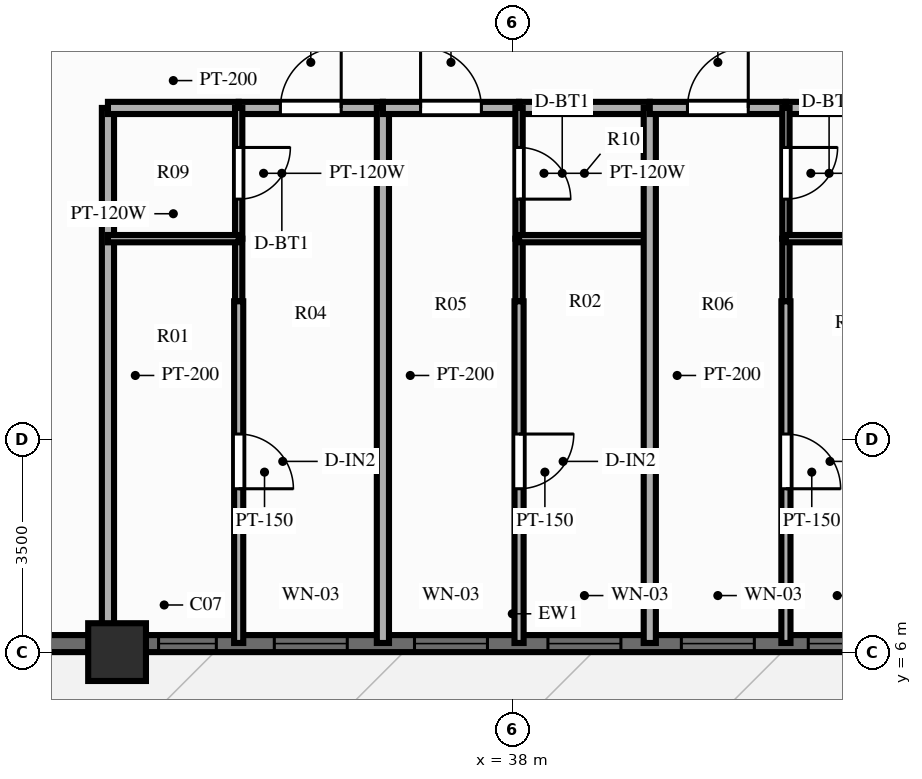
"""IFC4 building model, lengths in metres.
Left out: names, types, materials, properties, quantities, classifications, styles, units other than length and angle.
Written with IfcOpenShell. Run it as: python <this file> out.ifc"""

import sys

from ifc_helpers import new_model, si_unit, direction, frame, frame_2d, origin, origin_2d, place, context, subcontext, project, spatial, rectangle, extrude, source, transform, mapped, element, fill, save


model = new_model("IFC4")
c1 = context("Model", 3, precision=1e-05, world=origin(), true_north=direction((0.0, 1.0)))
c2 = subcontext(c1, "Body", "Model", "MODEL_VIEW")
j1 = project(units=[si_unit("LENGTHUNIT", "METRE"), si_unit("PLANEANGLEUNIT", "RADIAN")], contexts=[c1])
p1 = place(None, origin())
s1 = spatial("IfcSite", under=j1, at=p1, CompositionType="ELEMENT")
p2 = place(p1, origin())
s2 = spatial("IfcBuilding", under=s1, at=p2, CompositionType="ELEMENT")
p3 = place(p2, frame((0.0, 0.0, 169.0)))
s3 = spatial("IfcBuildingStorey", under=s2, at=p3, CompositionType="ELEMENT", Elevation=169.0)
m1 = source(origin(), c2, "Body", "SweptSolid", [
    extrude(rectangle(XDim=0.95, YDim=0.95, at=origin_2d()), origin(), (0.0, 0.0, 1.0), 3.9),
])
p4 = place(p3, frame((31.5, 6.0, 0.0), z_axis=(0.0, 0.0, 1.0), x_axis=(1.0, 0.0, 0.0)))
e1 = element("IfcColumn", 1, at=p4, inside=s3, PredefinedType="COLUMN", context=c2, shape_type="MappedRepresentation", body=[
    mapped(m1, transform((0.0, 0.0, 0.0), scale=1.0)),
])
p5 = place(p3, frame((21.0, 6.14, 0.0), z_axis=(0.0, 0.0, 1.0), x_axis=(1.0, 0.0, 0.0)))
e2 = element("IfcWall", 2, at=p5, inside=s3, PredefinedType="SOLIDWALL", context=c2, shape_type="SweptSolid", body=[
    extrude(rectangle(XDim=34.0, YDim=0.28, at=frame_2d((17.0, 0.0))), origin(), (0.0, 0.0, 1.0), 2.44),
])
p6 = place(p5, frame((5.8, 0.0, 0.0), z_axis=(0.0, 0.0, 1.0), x_axis=(-1.0, 0.0, 0.0)))
e3 = element("IfcOpeningElement", 3, at=p6, cuts=e2, PredefinedType="OPENING", context=c2, shape_type="SweptSolid", body=[
    extrude(rectangle(XDim=1.1, YDim=2.15, at=frame_2d((0.55, 1.075))), frame((0.0, 0.152, 0.0), z_axis=(0.0, -1.0, 0.0), x_axis=(1.0, 0.0, 0.0)), (0.0, 0.0, 1.0), 0.304),
])
p7 = place(p5, frame((11.183, 0.0, 0.25)))
e4 = element("IfcOpeningElement", 4, at=p7, cuts=e2, PredefinedType="OPENING", context=c2, shape_type="SweptSolid", body=[
    extrude(rectangle(XDim=0.95, YDim=1.5, at=frame_2d((0.475, 0.75))), frame((0.0, 0.152, 0.0), z_axis=(0.0, -1.0, 0.0), x_axis=(1.0, 0.0, 0.0)), (0.0, 0.0, 1.0), 0.304),
])
p8 = place(p5, frame((13.086, 0.0, 0.25)))
e5 = element("IfcOpeningElement", 5, at=p8, cuts=e2, PredefinedType="OPENING", context=c2, shape_type="SweptSolid", body=[
    extrude(rectangle(XDim=1.2, YDim=1.5, at=frame_2d((0.6, 0.75))), frame((0.0, 0.152, 0.0), z_axis=(0.0, -1.0, 0.0), x_axis=(1.0, 0.0, 0.0)), (0.0, 0.0, 1.0), 0.304),
])
p9 = place(p5, frame((15.392, 0.0, 0.25)))
e6 = element("IfcOpeningElement", 6, at=p9, cuts=e2, PredefinedType="OPENING", context=c2, shape_type="SweptSolid", body=[
    extrude(rectangle(XDim=1.2, YDim=1.5, at=frame_2d((0.6, 0.75))), frame((0.0, 0.152, 0.0), z_axis=(0.0, -1.0, 0.0), x_axis=(1.0, 0.0, 0.0)), (0.0, 0.0, 1.0), 0.304),
])
p10 = place(p5, frame((17.586, 0.0, 0.25)))
e7 = element("IfcOpeningElement", 7, at=p10, cuts=e2, PredefinedType="OPENING", context=c2, shape_type="SweptSolid", body=[
    extrude(rectangle(XDim=1.2, YDim=1.5, at=frame_2d((0.6, 0.75))), frame((0.0, 0.152, 0.0), z_axis=(0.0, -1.0, 0.0), x_axis=(1.0, 0.0, 0.0)), (0.0, 0.0, 1.0), 0.304),
])
p11 = place(p5, frame((19.781, 0.0, 0.25)))
e8 = element("IfcOpeningElement", 8, at=p11, cuts=e2, PredefinedType="OPENING", context=c2, shape_type="SweptSolid", body=[
    extrude(rectangle(XDim=1.2, YDim=1.5, at=frame_2d((0.6, 0.75))), frame((0.0, 0.152, 0.0), z_axis=(0.0, -1.0, 0.0), x_axis=(1.0, 0.0, 0.0)), (0.0, 0.0, 1.0), 0.304),
])
p12 = place(p5, frame((21.867, 0.0, 0.25)))
e9 = element("IfcOpeningElement", 9, at=p12, cuts=e2, PredefinedType="OPENING", context=c2, shape_type="SweptSolid", body=[
    extrude(rectangle(XDim=0.95, YDim=1.5, at=frame_2d((0.475, 0.75))), frame((0.0, 0.152, 0.0), z_axis=(0.0, -1.0, 0.0), x_axis=(1.0, 0.0, 0.0)), (0.0, 0.0, 1.0), 0.304),
])
p13 = place(p5, frame((28.15, 0.0, 0.25)))
e10 = element("IfcOpeningElement", 10, at=p13, cuts=e2, PredefinedType="OPENING", context=c2, shape_type="SweptSolid", body=[
    extrude(rectangle(XDim=1.2, YDim=1.5, at=frame_2d((0.6, 0.75))), frame((0.0, 0.152, 0.0), z_axis=(0.0, -1.0, 0.0), x_axis=(1.0, 0.0, 0.0)), (0.0, 0.0, 1.0), 0.304),
])
p14 = place(p3, frame((31.35, 14.95, 0.0), z_axis=(0.0, 0.0, 1.0), x_axis=(0.0, -1.0, 0.0)))
e11 = element("IfcWall", 11, at=p14, inside=s3, PredefinedType="PARTITIONING", context=c2, shape_type="SweptSolid", body=[
    extrude(rectangle(XDim=8.8, YDim=0.2, at=frame_2d((4.4, 0.0))), origin(), (0.0, 0.0, 1.0), 2.44),
])
p15 = place(p3, frame((31.35, 14.95, 0.0), z_axis=(0.0, 0.0, 1.0), x_axis=(1.0, 0.0, 0.0)))
e12 = element("IfcWall", 12, at=p15, inside=s3, PredefinedType="PARTITIONING", context=c2, shape_type="SweptSolid", body=[
    extrude(rectangle(XDim=2.15, YDim=0.2, at=frame_2d((1.075, 0.0))), origin(), (0.0, 0.0, 1.0), 3.56),
])
p16 = place(p3, frame((33.5, 14.95, 0.0), z_axis=(0.0, 0.0, 1.0), x_axis=(1.0, 0.0, 0.0)))
e13 = element("IfcWall", 13, at=p16, inside=s3, PredefinedType="PARTITIONING", context=c2, shape_type="SweptSolid", body=[
    extrude(rectangle(XDim=2.372, YDim=0.2, at=frame_2d((1.186, 0.0))), origin(), (0.0, 0.0, 1.0), 3.56),
])
p17 = place(p16, frame((0.686, 0.0, 0.0)))
e14 = element("IfcOpeningElement", 14, at=p17, cuts=e13, PredefinedType="OPENING", context=c2, shape_type="SweptSolid", body=[
    extrude(rectangle(XDim=1.0, YDim=2.15, at=frame_2d((0.5, 1.075))), frame((0.0, 0.112, 0.0), z_axis=(0.0, -1.0, 0.0), x_axis=(1.0, 0.0, 0.0)), (0.0, 0.0, 1.0), 0.224),
])
p18 = place(p3, frame((33.5, 14.95, 0.0), z_axis=(0.0, 0.0, 1.0), x_axis=(0.0, -1.0, 0.0)))
e15 = element("IfcWall", 15, at=p18, inside=s3, PredefinedType="PARTITIONING", context=c2, shape_type="SweptSolid", body=[
    extrude(rectangle(XDim=2.15, YDim=0.12, at=frame_2d((1.075, 0.0))), origin(), (0.0, 0.0, 1.0), 3.56),
])
p19 = place(p18, frame((0.65, 0.0, 0.0)))
e16 = element("IfcOpeningElement", 16, at=p19, cuts=e15, PredefinedType="OPENING", context=c2, shape_type="SweptSolid", body=[
    extrude(rectangle(XDim=0.85, YDim=2.05, at=frame_2d((0.425, 1.025))), frame((0.0, 0.072, 0.0), z_axis=(0.0, -1.0, 0.0), x_axis=(1.0, 0.0, 0.0)), (0.0, 0.0, 1.0), 0.144),
])
p20 = place(p3, frame((33.5, 12.8, 0.0), z_axis=(0.0, 0.0, 1.0), x_axis=(0.0, -1.0, 0.0)))
e17 = element("IfcWall", 17, at=p20, inside=s3, PredefinedType="PARTITIONING", context=c2, shape_type="SweptSolid", body=[
    extrude(rectangle(XDim=1.03, YDim=0.12, at=frame_2d((0.515, 0.0))), origin(), (0.0, 0.0, 1.0), 3.56),
])
p21 = place(p3, frame((31.35, 12.8, 0.0), z_axis=(0.0, 0.0, 1.0), x_axis=(1.0, 0.0, 0.0)))
e18 = element("IfcWall", 18, at=p21, inside=s3, PredefinedType="PARTITIONING", context=c2, shape_type="SweptSolid", body=[
    extrude(rectangle(XDim=2.15, YDim=0.12, at=frame_2d((1.075, 0.0))), origin(), (0.0, 0.0, 1.0), 3.56),
])
p22 = place(p3, frame((33.5, 11.77, 0.0), z_axis=(0.0, 0.0, 1.0), x_axis=(0.0, -1.0, 0.0)))
e19 = element("IfcWall", 19, at=p22, inside=s3, PredefinedType="PARTITIONING", context=c2, shape_type="SweptSolid", body=[
    extrude(rectangle(XDim=5.62, YDim=0.15, at=frame_2d((2.81, 0.0))), origin(), (0.0, 0.0, 1.0), 3.56),
])
p23 = place(p22, frame((2.183, 0.0, 0.0)))
e20 = element("IfcOpeningElement", 20, at=p23, cuts=e19, PredefinedType="OPENING", context=c2, shape_type="SweptSolid", body=[
    extrude(rectangle(XDim=0.9, YDim=2.1, at=frame_2d((0.45, 1.05))), frame((0.0, 0.087, 0.0), z_axis=(0.0, -1.0, 0.0), x_axis=(1.0, 0.0, 0.0)), (0.0, 0.0, 1.0), 0.174),
])
p24 = place(p3, frame((35.872, 14.95, 0.0), z_axis=(0.0, 0.0, 1.0), x_axis=(0.0, -1.0, 0.0)))
e21 = element("IfcWall", 21, at=p24, inside=s3, PredefinedType="PARTITIONING", context=c2, shape_type="SweptSolid", body=[
    extrude(rectangle(XDim=8.8, YDim=0.2, at=frame_2d((4.4, 0.0))), origin(), (0.0, 0.0, 1.0), 3.56),
])
p25 = place(p3, frame((35.872, 14.95, 0.0), z_axis=(0.0, 0.0, 1.0), x_axis=(1.0, 0.0, 0.0)))
e22 = element("IfcWall", 22, at=p25, inside=s3, PredefinedType="PARTITIONING", context=c2, shape_type="SweptSolid", body=[
    extrude(rectangle(XDim=2.239, YDim=0.2, at=frame_2d((1.12, 0.0))), origin(), (0.0, 0.0, 1.0), 3.56),
])
p26 = place(p25, frame((0.619, 0.0, 0.0)))
e23 = element("IfcOpeningElement", 23, at=p26, cuts=e22, PredefinedType="OPENING", context=c2, shape_type="SweptSolid", body=[
    extrude(rectangle(XDim=1.0, YDim=2.15, at=frame_2d((0.5, 1.075))), frame((0.0, 0.112, 0.0), z_axis=(0.0, -1.0, 0.0), x_axis=(1.0, 0.0, 0.0)), (0.0, 0.0, 1.0), 0.224),
])
p27 = place(p3, frame((38.111, 14.95, 0.0), z_axis=(0.0, 0.0, 1.0), x_axis=(1.0, 0.0, 0.0)))
e24 = element("IfcWall", 24, at=p27, inside=s3, PredefinedType="PARTITIONING", context=c2, shape_type="SweptSolid", body=[
    extrude(rectangle(XDim=2.15, YDim=0.2, at=frame_2d((1.075, 0.0))), origin(), (0.0, 0.0, 1.0), 3.56),
])
p28 = place(p3, frame((38.111, 14.95, 0.0), z_axis=(0.0, 0.0, 1.0), x_axis=(0.0, -1.0, 0.0)))
e25 = element("IfcWall", 25, at=p28, inside=s3, PredefinedType="PARTITIONING", context=c2, shape_type="SweptSolid", body=[
    extrude(rectangle(XDim=2.15, YDim=0.12, at=frame_2d((1.075, 0.0))), origin(), (0.0, 0.0, 1.0), 3.56),
])
p29 = place(p28, frame((0.65, 0.0, 0.0)))
e26 = element("IfcOpeningElement", 26, at=p29, cuts=e25, PredefinedType="OPENING", context=c2, shape_type="SweptSolid", body=[
    extrude(rectangle(XDim=0.85, YDim=2.05, at=frame_2d((0.425, 1.025))), frame((0.0, 0.072, 0.0), z_axis=(0.0, -1.0, 0.0), x_axis=(1.0, 0.0, 0.0)), (0.0, 0.0, 1.0), 0.144),
])
p30 = place(p3, frame((38.111, 12.8, 0.0), z_axis=(0.0, 0.0, 1.0), x_axis=(0.0, -1.0, 0.0)))
e27 = element("IfcWall", 27, at=p30, inside=s3, PredefinedType="PARTITIONING", context=c2, shape_type="SweptSolid", body=[
    extrude(rectangle(XDim=1.03, YDim=0.12, at=frame_2d((0.515, 0.0))), origin(), (0.0, 0.0, 1.0), 3.56),
])
p31 = place(p3, frame((38.111, 12.8, 0.0), z_axis=(0.0, 0.0, 1.0), x_axis=(1.0, 0.0, 0.0)))
e28 = element("IfcWall", 28, at=p31, inside=s3, PredefinedType="PARTITIONING", context=c2, shape_type="SweptSolid", body=[
    extrude(rectangle(XDim=2.15, YDim=0.12, at=frame_2d((1.075, 0.0))), origin(), (0.0, 0.0, 1.0), 3.56),
])
p32 = place(p3, frame((38.111, 11.77, 0.0), z_axis=(0.0, 0.0, 1.0), x_axis=(0.0, -1.0, 0.0)))
e29 = element("IfcWall", 29, at=p32, inside=s3, PredefinedType="PARTITIONING", context=c2, shape_type="SweptSolid", body=[
    extrude(rectangle(XDim=5.62, YDim=0.15, at=frame_2d((2.81, 0.0))), origin(), (0.0, 0.0, 1.0), 3.56),
])
p33 = place(p32, frame((2.183, 0.0, 0.0)))
e30 = element("IfcOpeningElement", 30, at=p33, cuts=e29, PredefinedType="OPENING", context=c2, shape_type="SweptSolid", body=[
    extrude(rectangle(XDim=0.9, YDim=2.1, at=frame_2d((0.45, 1.05))), frame((0.0, 0.087, 0.0), z_axis=(0.0, -1.0, 0.0), x_axis=(1.0, 0.0, 0.0)), (0.0, 0.0, 1.0), 0.174),
])
p34 = place(p3, frame((40.261, 14.95, 0.0), z_axis=(0.0, 0.0, 1.0), x_axis=(0.0, -1.0, 0.0)))
e31 = element("IfcWall", 31, at=p34, inside=s3, PredefinedType="PARTITIONING", context=c2, shape_type="SweptSolid", body=[
    extrude(rectangle(XDim=8.8, YDim=0.2, at=frame_2d((4.4, 0.0))), origin(), (0.0, 0.0, 1.0), 3.56),
])
p35 = place(p3, frame((40.261, 14.95, 0.0), z_axis=(0.0, 0.0, 1.0), x_axis=(1.0, 0.0, 0.0)))
e32 = element("IfcWall", 32, at=p35, inside=s3, PredefinedType="PARTITIONING", context=c2, shape_type="SweptSolid", body=[
    extrude(rectangle(XDim=2.239, YDim=0.2, at=frame_2d((1.12, 0.0))), origin(), (0.0, 0.0, 1.0), 3.56),
])
p36 = place(p35, frame((0.619, 0.0, 0.0)))
e33 = element("IfcOpeningElement", 33, at=p36, cuts=e32, PredefinedType="OPENING", context=c2, shape_type="SweptSolid", body=[
    extrude(rectangle(XDim=1.0, YDim=2.15, at=frame_2d((0.5, 1.075))), frame((0.0, 0.112, 0.0), z_axis=(0.0, -1.0, 0.0), x_axis=(1.0, 0.0, 0.0)), (0.0, 0.0, 1.0), 0.224),
])
p37 = place(p3, frame((42.5, 14.95, 0.0), z_axis=(0.0, 0.0, 1.0), x_axis=(1.0, 0.0, 0.0)))
e34 = element("IfcWall", 34, at=p37, inside=s3, PredefinedType="PARTITIONING", context=c2, shape_type="SweptSolid", body=[
    extrude(rectangle(XDim=2.15, YDim=0.2, at=frame_2d((1.075, 0.0))), origin(), (0.0, 0.0, 1.0), 3.56),
])
p38 = place(p3, frame((42.5, 14.95, 0.0), z_axis=(0.0, 0.0, 1.0), x_axis=(0.0, -1.0, 0.0)))
e35 = element("IfcWall", 35, at=p38, inside=s3, PredefinedType="PARTITIONING", context=c2, shape_type="SweptSolid", body=[
    extrude(rectangle(XDim=2.15, YDim=0.12, at=frame_2d((1.075, 0.0))), origin(), (0.0, 0.0, 1.0), 3.56),
])
p39 = place(p38, frame((0.65, 0.0, 0.0)))
e36 = element("IfcOpeningElement", 36, at=p39, cuts=e35, PredefinedType="OPENING", context=c2, shape_type="SweptSolid", body=[
    extrude(rectangle(XDim=0.85, YDim=2.05, at=frame_2d((0.425, 1.025))), frame((0.0, 0.072, 0.0), z_axis=(0.0, -1.0, 0.0), x_axis=(1.0, 0.0, 0.0)), (0.0, 0.0, 1.0), 0.144),
])
p40 = place(p3, frame((42.5, 12.8, 0.0), z_axis=(0.0, 0.0, 1.0), x_axis=(0.0, -1.0, 0.0)))
e37 = element("IfcWall", 37, at=p40, inside=s3, PredefinedType="PARTITIONING", context=c2, shape_type="SweptSolid", body=[
    extrude(rectangle(XDim=1.03, YDim=0.12, at=frame_2d((0.515, 0.0))), origin(), (0.0, 0.0, 1.0), 3.56),
])
p41 = place(p3, frame((42.5, 12.8, 0.0), z_axis=(0.0, 0.0, 1.0), x_axis=(1.0, 0.0, 0.0)))
e38 = element("IfcWall", 38, at=p41, inside=s3, PredefinedType="PARTITIONING", context=c2, shape_type="SweptSolid", body=[
    extrude(rectangle(XDim=2.15, YDim=0.12, at=frame_2d((1.075, 0.0))), origin(), (0.0, 0.0, 1.0), 3.56),
])
p42 = place(p3, frame((42.5, 11.77, 0.0), z_axis=(0.0, 0.0, 1.0), x_axis=(0.0, -1.0, 0.0)))
e39 = element("IfcWall", 39, at=p42, inside=s3, PredefinedType="PARTITIONING", context=c2, shape_type="SweptSolid", body=[
    extrude(rectangle(XDim=5.62, YDim=0.15, at=frame_2d((2.81, 0.0))), origin(), (0.0, 0.0, 1.0), 3.56),
])
p43 = place(p42, frame((2.183, 0.0, 0.0)))
e40 = element("IfcOpeningElement", 40, at=p43, cuts=e39, PredefinedType="OPENING", context=c2, shape_type="SweptSolid", body=[
    extrude(rectangle(XDim=0.9, YDim=2.1, at=frame_2d((0.45, 1.05))), frame((0.0, 0.087, 0.0), z_axis=(0.0, -1.0, 0.0), x_axis=(1.0, 0.0, 0.0)), (0.0, 0.0, 1.0), 0.174),
])
m2 = source(origin(), c2, "Body", "SweptSolid", [
    extrude(rectangle(XDim=0.95, YDim=1.5, at=frame_2d((0.475, 0.75))), frame((0.0, 0.03, 0.0), z_axis=(0.0, -1.0, 0.0), x_axis=(1.0, 0.0, 0.0)), (0.0, 0.0, 1.0), 0.06),
])
p44 = place(p7, origin())
e41 = element("IfcWindow", 41, at=p44, inside=s3, PartitioningType="SINGLE_PANEL", PredefinedType="WINDOW", context=c2, shape_type="MappedRepresentation", body=[
    mapped(m2, transform((0.0, 0.0, 0.0), scale=1.0)),
])
fill(e4, e41)
m3 = source(origin(), c2, "Body", "SweptSolid", [
    extrude(rectangle(XDim=1.2, YDim=1.5, at=frame_2d((0.6, 0.75))), frame((0.0, 0.03, 0.0), z_axis=(0.0, -1.0, 0.0), x_axis=(1.0, 0.0, 0.0)), (0.0, 0.0, 1.0), 0.06),
])
p45 = place(p8, origin())
e42 = element("IfcWindow", 42, at=p45, inside=s3, PartitioningType="SINGLE_PANEL", PredefinedType="WINDOW", context=c2, shape_type="MappedRepresentation", body=[
    mapped(m3, transform((0.0, 0.0, 0.0), scale=1.0)),
])
fill(e5, e42)
p46 = place(p9, origin())
e43 = element("IfcWindow", 43, at=p46, inside=s3, PartitioningType="SINGLE_PANEL", PredefinedType="WINDOW", context=c2, shape_type="MappedRepresentation", body=[
    mapped(m3, transform((0.0, 0.0, 0.0), scale=1.0)),
])
fill(e6, e43)
p47 = place(p10, origin())
e44 = element("IfcWindow", 44, at=p47, inside=s3, PartitioningType="SINGLE_PANEL", PredefinedType="WINDOW", context=c2, shape_type="MappedRepresentation", body=[
    mapped(m3, transform((0.0, 0.0, 0.0), scale=1.0)),
])
fill(e7, e44)
p48 = place(p11, origin())
e45 = element("IfcWindow", 45, at=p48, inside=s3, PartitioningType="SINGLE_PANEL", PredefinedType="WINDOW", context=c2, shape_type="MappedRepresentation", body=[
    mapped(m3, transform((0.0, 0.0, 0.0), scale=1.0)),
])
fill(e8, e45)
p49 = place(p12, origin())
e46 = element("IfcWindow", 46, at=p49, inside=s3, PartitioningType="SINGLE_PANEL", PredefinedType="WINDOW", context=c2, shape_type="MappedRepresentation", body=[
    mapped(m2, transform((0.0, 0.0, 0.0), scale=1.0)),
])
fill(e9, e46)
m4 = source(origin(), c2, "Body", "SweptSolid", [
    extrude(rectangle(XDim=1.0, YDim=2.15, at=frame_2d((0.5, 1.075))), frame((0.0, 0.025, 0.0), z_axis=(0.0, -1.0, 0.0), x_axis=(1.0, 0.0, 0.0)), (0.0, 0.0, 1.0), 0.05),
])
p50 = place(p17, origin())
e47 = element("IfcDoor", 47, at=p50, inside=s3, OperationType="SINGLE_SWING_RIGHT", PredefinedType="DOOR", context=c2, shape_type="MappedRepresentation", body=[
    mapped(m4, transform((0.0, 0.0, 0.0), scale=1.0)),
])
fill(e14, e47)
m5 = source(origin(), c2, "Body", "SweptSolid", [
    extrude(rectangle(XDim=0.85, YDim=2.05, at=frame_2d((0.425, 1.025))), frame((0.0, 0.025, 0.0), z_axis=(0.0, -1.0, 0.0), x_axis=(1.0, 0.0, 0.0)), (0.0, 0.0, 1.0), 0.05),
])
p51 = place(p19, origin())
e48 = element("IfcDoor", 48, at=p51, inside=s3, OperationType="SINGLE_SWING_LEFT", PredefinedType="DOOR", context=c2, shape_type="MappedRepresentation", body=[
    mapped(m5, transform((0.0, 0.0, 0.0), scale=1.0)),
])
fill(e16, e48)
m6 = source(origin(), c2, "Body", "SweptSolid", [
    extrude(rectangle(XDim=0.9, YDim=2.1, at=frame_2d((0.45, 1.05))), frame((0.0, 0.025, 0.0), z_axis=(0.0, -1.0, 0.0), x_axis=(1.0, 0.0, 0.0)), (0.0, 0.0, 1.0), 0.05),
])
p52 = place(p23, origin())
e49 = element("IfcDoor", 49, at=p52, inside=s3, OperationType="SINGLE_SWING_RIGHT", PredefinedType="DOOR", context=c2, shape_type="MappedRepresentation", body=[
    mapped(m6, transform((0.0, 0.0, 0.0), scale=1.0)),
])
fill(e20, e49)
p53 = place(p26, origin())
e50 = element("IfcDoor", 50, at=p53, inside=s3, OperationType="SINGLE_SWING_LEFT", PredefinedType="DOOR", context=c2, shape_type="MappedRepresentation", body=[
    mapped(m4, transform((0.0, 0.0, 0.0), scale=1.0)),
])
fill(e23, e50)
p54 = place(p29, origin())
e51 = element("IfcDoor", 51, at=p54, inside=s3, OperationType="SINGLE_SWING_RIGHT", PredefinedType="DOOR", context=c2, shape_type="MappedRepresentation", body=[
    mapped(m5, transform((0.0, 0.0, 0.0), scale=1.0)),
])
fill(e26, e51)
p55 = place(p33, origin())
e52 = element("IfcDoor", 52, at=p55, inside=s3, OperationType="SINGLE_SWING_LEFT", PredefinedType="DOOR", context=c2, shape_type="MappedRepresentation", body=[
    mapped(m6, transform((0.0, 0.0, 0.0), scale=1.0)),
])
fill(e30, e52)
p56 = place(p36, origin())
e53 = element("IfcDoor", 53, at=p56, inside=s3, OperationType="SINGLE_SWING_RIGHT", PredefinedType="DOOR", context=c2, shape_type="MappedRepresentation", body=[
    mapped(m4, transform((0.0, 0.0, 0.0), scale=1.0)),
])
fill(e33, e53)
p57 = place(p39, origin())
e54 = element("IfcDoor", 54, at=p57, inside=s3, OperationType="SINGLE_SWING_LEFT", PredefinedType="DOOR", context=c2, shape_type="MappedRepresentation", body=[
    mapped(m5, transform((0.0, 0.0, 0.0), scale=1.0)),
])
fill(e36, e54)
p58 = place(p43, origin())
e55 = element("IfcDoor", 55, at=p58, inside=s3, OperationType="SINGLE_SWING_RIGHT", PredefinedType="DOOR", context=c2, shape_type="MappedRepresentation", body=[
    mapped(m6, transform((0.0, 0.0, 0.0), scale=1.0)),
])
fill(e40, e55)
save(model, sys.argv[1])
